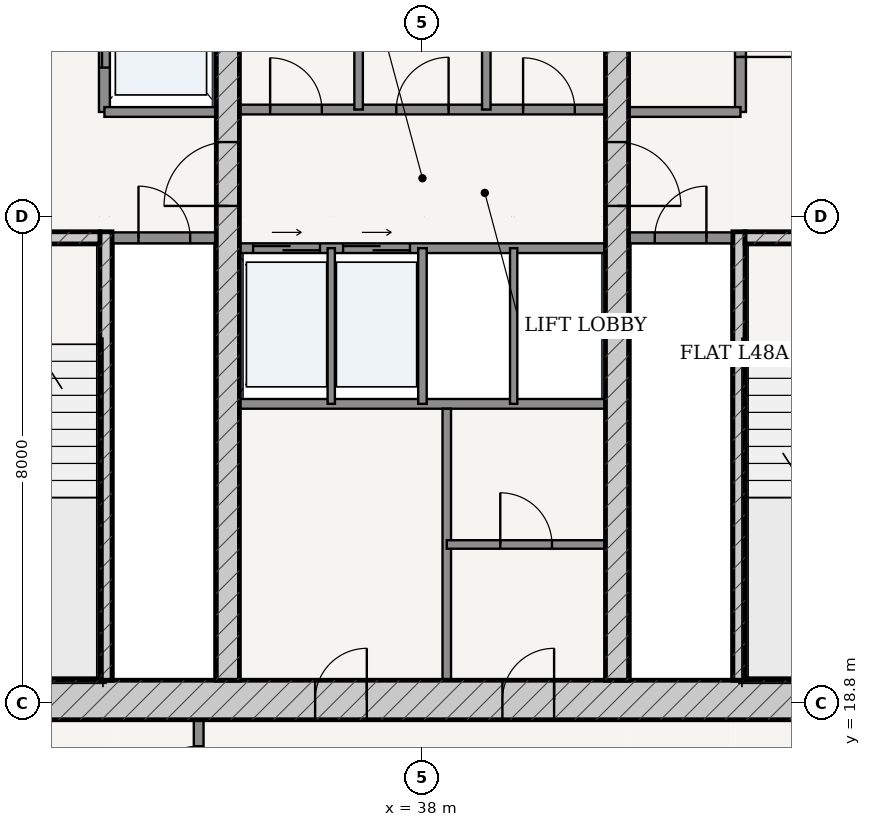
"""IFC4 building model, lengths in metres.
Left out: names, types, materials, properties, quantities, classifications, styles, units other than length and angle.
Written with IfcOpenShell. Run it as: python <this file> out.ifc"""

import sys

from ifc_helpers import new_model, si_unit, direction, frame, frame_2d, origin, place, context, subcontext, project, spatial, rectangle, extrude, source, transform, mapped, element, fill, save


model = new_model("IFC4")
c1 = context("Model", 3, precision=1e-05, world=origin(), true_north=direction((-0.2419218956, 0.970295726276)))
c2 = subcontext(c1, "Body", "Model", "MODEL_VIEW")
j1 = project(units=[si_unit("LENGTHUNIT", "METRE"), si_unit("PLANEANGLEUNIT", "RADIAN")], contexts=[c1])
p1 = place(None, origin())
s1 = spatial("IfcSite", under=j1, at=p1, CompositionType="ELEMENT")
p2 = place(p1, origin())
s2 = spatial("IfcBuilding", under=s1, at=p2, CompositionType="ELEMENT")
p3 = place(p2, frame((0.0, 0.0, 182.2)))
s3 = spatial("IfcBuildingStorey", under=s2, at=p3, CompositionType="ELEMENT", Elevation=182.2)
p4 = place(p3, frame((28.725, 18.85, 0.0), z_axis=(0.0, 0.0, 1.0), x_axis=(1.0, 0.0, 0.0)))
e1 = element("IfcWall", 1, at=p4, inside=s3, PredefinedType="SHEAR", context=c2, shape_type="SweptSolid", body=[
    extrude(rectangle(XDim=18.55, YDim=0.65, at=frame_2d((9.275, 0.0))), origin(), (0.0, 0.0, 1.0), 3.15),
])
p5 = place(p4, frame((7.51, 0.0, 0.0)))
e2 = element("IfcOpeningElement", 2, at=p5, cuts=e1, PredefinedType="OPENING", context=c2, shape_type="SweptSolid", body=[
    extrude(rectangle(XDim=0.85, YDim=2.1, at=frame_2d((0.425, 1.05))), frame((0.0, 0.335, 0.0), z_axis=(0.0, -1.0, 0.0), x_axis=(1.0, 0.0, 0.0)), (0.0, 0.0, 1.0), 0.67),
])
p6 = place(p4, frame((10.59, 0.0, 0.0)))
e3 = element("IfcOpeningElement", 3, at=p6, cuts=e1, PredefinedType="OPENING", context=c2, shape_type="SweptSolid", body=[
    extrude(rectangle(XDim=0.85, YDim=2.1, at=frame_2d((0.425, 1.05))), frame((0.0, 0.335, 0.0), z_axis=(0.0, -1.0, 0.0), x_axis=(1.0, 0.0, 0.0)), (0.0, 0.0, 1.0), 0.67),
])
p7 = place(p3, frame((32.795, 19.175, 0.0), z_axis=(0.0, 0.0, 1.0), x_axis=(0.0, 1.0, 0.0)))
e4 = element("IfcWall", 4, at=p7, inside=s3, PredefinedType="SOLIDWALL", context=c2, shape_type="SweptSolid", body=[
    extrude(rectangle(XDim=7.375, YDim=0.2, at=frame_2d((3.688, 0.0))), origin(), (0.0, 0.0, 1.0), 3.15),
])
p8 = place(p3, frame((29.375, 26.45, 0.0), z_axis=(0.0, 0.0, 1.0), x_axis=(1.0, 0.0, 0.0)))
e5 = element("IfcWall", 5, at=p8, inside=s3, PredefinedType="SOLIDWALL", context=c2, shape_type="SweptSolid", body=[
    extrude(rectangle(XDim=3.32, YDim=0.2, at=frame_2d((1.66, 0.0))), origin(), (0.0, 0.0, 1.0), 3.15),
])
p9 = place(p8, frame((1.185, 0.0, 0.0)))
e6 = element("IfcOpeningElement", 6, at=p9, cuts=e5, PredefinedType="OPENING", context=c2, shape_type="SweptSolid", body=[
    extrude(rectangle(XDim=0.95, YDim=2.15, at=frame_2d((0.475, 1.075))), frame((0.0, 0.11, 0.0), z_axis=(0.0, -1.0, 0.0), x_axis=(1.0, 0.0, 0.0)), (0.0, 0.0, 1.0), 0.22),
])
p10 = place(p3, frame((43.205, 19.175, 0.0), z_axis=(0.0, 0.0, 1.0), x_axis=(0.0, 1.0, 0.0)))
e7 = element("IfcWall", 7, at=p10, inside=s3, PredefinedType="SOLIDWALL", context=c2, shape_type="SweptSolid", body=[
    extrude(rectangle(XDim=7.375, YDim=0.2, at=frame_2d((3.688, 0.0))), origin(), (0.0, 0.0, 1.0), 3.15),
])
p11 = place(p3, frame((43.305, 26.45, 0.0), z_axis=(0.0, 0.0, 1.0), x_axis=(1.0, 0.0, 0.0)))
e8 = element("IfcWall", 8, at=p11, inside=s3, PredefinedType="SOLIDWALL", context=c2, shape_type="SweptSolid", body=[
    extrude(rectangle(XDim=3.32, YDim=0.2, at=frame_2d((1.66, 0.0))), origin(), (0.0, 0.0, 1.0), 3.15),
])
p12 = place(p11, frame((1.185, 0.0, 0.0)))
e9 = element("IfcOpeningElement", 9, at=p12, cuts=e8, PredefinedType="OPENING", context=c2, shape_type="SweptSolid", body=[
    extrude(rectangle(XDim=0.95, YDim=2.15, at=frame_2d((0.475, 1.075))), frame((0.0, 0.11, 0.0), z_axis=(0.0, -1.0, 0.0), x_axis=(1.0, 0.0, 0.0)), (0.0, 0.0, 1.0), 0.22),
])
p13 = place(p3, frame((34.8, 19.175, 0.0), z_axis=(0.0, 0.0, 1.0), x_axis=(0.0, 1.0, 0.0)))
e10 = element("IfcWall", 10, at=p13, inside=s3, PredefinedType="SHEAR", context=c2, shape_type="SweptSolid", body=[
    extrude(rectangle(XDim=15.25, YDim=0.38, at=frame_2d((7.625, 0.0))), origin(), (0.0, 0.0, 1.0), 3.15),
])
p14 = place(p13, frame((7.8, 0.0, 0.0)))
e11 = element("IfcOpeningElement", 11, at=p14, cuts=e10, PredefinedType="OPENING", context=c2, shape_type="SweptSolid", body=[
    extrude(rectangle(XDim=1.05, YDim=2.15, at=frame_2d((0.525, 1.075))), frame((0.0, 0.2, 0.0), z_axis=(0.0, -1.0, 0.0), x_axis=(1.0, 0.0, 0.0)), (0.0, 0.0, 1.0), 0.4),
])
p15 = place(p3, frame((41.2, 19.175, 0.0), z_axis=(0.0, 0.0, 1.0), x_axis=(0.0, 1.0, 0.0)))
e12 = element("IfcWall", 12, at=p15, inside=s3, PredefinedType="SHEAR", context=c2, shape_type="SweptSolid", body=[
    extrude(rectangle(XDim=15.25, YDim=0.38, at=frame_2d((7.625, 0.0))), origin(), (0.0, 0.0, 1.0), 3.15),
])
p16 = place(p15, frame((7.8, 0.0, 0.0)))
e13 = element("IfcOpeningElement", 13, at=p16, cuts=e12, PredefinedType="OPENING", context=c2, shape_type="SweptSolid", body=[
    extrude(rectangle(XDim=1.05, YDim=2.15, at=frame_2d((0.525, 1.075))), frame((0.0, 0.2, 0.0), z_axis=(0.0, -1.0, 0.0), x_axis=(1.0, 0.0, 0.0)), (0.0, 0.0, 1.0), 0.4),
])
p17 = place(p3, frame((32.9, 26.45, 0.0), z_axis=(0.0, 0.0, 1.0), x_axis=(1.0, 0.0, 0.0)))
e14 = element("IfcWall", 14, at=p17, inside=s3, PredefinedType="PARTITIONING", context=c2, shape_type="SweptSolid", body=[
    extrude(rectangle(XDim=1.71, YDim=0.18, at=frame_2d((0.855, 0.0))), origin(), (0.0, 0.0, 1.0), 3.15),
])
p18 = place(p17, frame((0.43, 0.0, 0.0)))
e15 = element("IfcOpeningElement", 15, at=p18, cuts=e14, PredefinedType="OPENING", context=c2, shape_type="SweptSolid", body=[
    extrude(rectangle(XDim=0.85, YDim=2.1, at=frame_2d((0.425, 1.05))), frame((0.0, 0.1, 0.0), z_axis=(0.0, -1.0, 0.0), x_axis=(1.0, 0.0, 0.0)), (0.0, 0.0, 1.0), 0.2),
])
p19 = place(p3, frame((41.39, 26.45, 0.0), z_axis=(0.0, 0.0, 1.0), x_axis=(1.0, 0.0, 0.0)))
e16 = element("IfcWall", 16, at=p19, inside=s3, PredefinedType="PARTITIONING", context=c2, shape_type="SweptSolid", body=[
    extrude(rectangle(XDim=1.71, YDim=0.18, at=frame_2d((0.855, 0.0))), origin(), (0.0, 0.0, 1.0), 3.15),
])
p20 = place(p19, frame((0.43, 0.0, 0.0)))
e17 = element("IfcOpeningElement", 17, at=p20, cuts=e16, PredefinedType="OPENING", context=c2, shape_type="SweptSolid", body=[
    extrude(rectangle(XDim=0.85, YDim=2.1, at=frame_2d((0.425, 1.05))), frame((0.0, 0.1, 0.0), z_axis=(0.0, -1.0, 0.0), x_axis=(1.0, 0.0, 0.0)), (0.0, 0.0, 1.0), 0.2),
])
p21 = place(p3, frame((32.77, 28.52, 0.0), z_axis=(0.0, 0.0, 1.0), x_axis=(0.0, 1.0, 0.0)))
e18 = element("IfcWall", 18, at=p21, inside=s3, PredefinedType="PARTITIONING", context=c2, shape_type="SweptSolid", body=[
    extrude(rectangle(XDim=5.905, YDim=0.18, at=frame_2d((2.953, 0.0))), origin(), (0.0, 0.0, 1.0), 3.15),
])
p22 = place(p21, frame((3.655, 0.0, 0.0)))
e19 = element("IfcOpeningElement", 19, at=p22, cuts=e18, PredefinedType="OPENING", context=c2, shape_type="SweptSolid", body=[
    extrude(rectangle(XDim=1.15, YDim=2.2, at=frame_2d((0.575, 1.1))), frame((0.0, 0.1, 0.0), z_axis=(0.0, -1.0, 0.0), x_axis=(1.0, 0.0, 0.0)), (0.0, 0.0, 1.0), 0.2),
])
p23 = place(p21, frame((0.73, 0.0, 0.0)))
e20 = element("IfcOpeningElement", 20, at=p23, cuts=e18, PredefinedType="OPENING", context=c2, shape_type="SweptSolid", body=[
    extrude(rectangle(XDim=1.2, YDim=2.25, at=frame_2d((0.6, 1.125))), frame((0.0, 0.1, 0.0), z_axis=(0.0, -1.0, 0.0), x_axis=(1.0, 0.0, 0.0)), (0.0, 0.0, 1.0), 0.2),
])
p24 = place(p3, frame((32.77, 28.52, 0.0), z_axis=(0.0, 0.0, 1.0), x_axis=(1.0, 0.0, 0.0)))
e21 = element("IfcWall", 21, at=p24, inside=s3, PredefinedType="PARTITIONING", context=c2, shape_type="SweptSolid", body=[
    extrude(rectangle(XDim=1.84, YDim=0.16, at=frame_2d((0.92, 0.0))), origin(), (0.0, 0.0, 1.0), 3.15),
])
p25 = place(p3, frame((43.23, 28.52, 0.0), z_axis=(0.0, 0.0, 1.0), x_axis=(0.0, 1.0, 0.0)))
e22 = element("IfcWall", 22, at=p25, inside=s3, PredefinedType="PARTITIONING", context=c2, shape_type="SweptSolid", body=[
    extrude(rectangle(XDim=5.905, YDim=0.18, at=frame_2d((2.953, 0.0))), origin(), (0.0, 0.0, 1.0), 3.15),
])
p26 = place(p25, frame((0.905, 0.0, 0.0)))
e23 = element("IfcOpeningElement", 23, at=p26, cuts=e22, PredefinedType="OPENING", context=c2, shape_type="SweptSolid", body=[
    extrude(rectangle(XDim=0.85, YDim=2.1, at=frame_2d((0.425, 1.05))), frame((0.0, 0.1, 0.0), z_axis=(0.0, -1.0, 0.0), x_axis=(1.0, 0.0, 0.0)), (0.0, 0.0, 1.0), 0.2),
])
p27 = place(p25, frame((3.655, 0.0, 0.0)))
e24 = element("IfcOpeningElement", 24, at=p27, cuts=e22, PredefinedType="OPENING", context=c2, shape_type="SweptSolid", body=[
    extrude(rectangle(XDim=1.15, YDim=2.2, at=frame_2d((0.575, 1.1))), frame((0.0, 0.1, 0.0), z_axis=(0.0, -1.0, 0.0), x_axis=(1.0, 0.0, 0.0)), (0.0, 0.0, 1.0), 0.2),
])
p28 = place(p3, frame((41.39, 28.52, 0.0), z_axis=(0.0, 0.0, 1.0), x_axis=(1.0, 0.0, 0.0)))
e25 = element("IfcWall", 25, at=p28, inside=s3, PredefinedType="PARTITIONING", context=c2, shape_type="SweptSolid", body=[
    extrude(rectangle(XDim=1.84, YDim=0.16, at=frame_2d((0.92, 0.0))), origin(), (0.0, 0.0, 1.0), 3.15),
])
p29 = place(p3, frame((34.99, 28.56, 0.0), z_axis=(0.0, 0.0, 1.0), x_axis=(1.0, 0.0, 0.0)))
e26 = element("IfcWall", 26, at=p29, inside=s3, PredefinedType="PARTITIONING", context=c2, shape_type="SweptSolid", body=[
    extrude(rectangle(XDim=6.02, YDim=0.16, at=frame_2d((3.01, 0.0))), origin(), (0.0, 0.0, 1.0), 3.15),
])
p30 = place(p29, frame((0.505, 0.0, 0.0)))
e27 = element("IfcOpeningElement", 27, at=p30, cuts=e26, PredefinedType="OPENING", context=c2, shape_type="SweptSolid", body=[
    extrude(rectangle(XDim=0.85, YDim=2.1, at=frame_2d((0.425, 1.05))), frame((0.0, 0.09, 0.0), z_axis=(0.0, -1.0, 0.0), x_axis=(1.0, 0.0, 0.0)), (0.0, 0.0, 1.0), 0.18),
])
p31 = place(p29, frame((2.58, 0.0, 0.0)))
e28 = element("IfcOpeningElement", 28, at=p31, cuts=e26, PredefinedType="OPENING", context=c2, shape_type="SweptSolid", body=[
    extrude(rectangle(XDim=0.86, YDim=2.1, at=frame_2d((0.43, 1.05))), frame((0.0, 0.09, 0.0), z_axis=(0.0, -1.0, 0.0), x_axis=(1.0, 0.0, 0.0)), (0.0, 0.0, 1.0), 0.18),
])
p32 = place(p29, frame((4.665, 0.0, 0.0)))
e29 = element("IfcOpeningElement", 29, at=p32, cuts=e26, PredefinedType="OPENING", context=c2, shape_type="SweptSolid", body=[
    extrude(rectangle(XDim=0.85, YDim=2.1, at=frame_2d((0.425, 1.05))), frame((0.0, 0.09, 0.0), z_axis=(0.0, -1.0, 0.0), x_axis=(1.0, 0.0, 0.0)), (0.0, 0.0, 1.0), 0.18),
])
for number, where, z_axis, x_axis in (
    (30, (36.95, 28.56, 0.0), (0.0, 0.0, 1.0), (0.0, 1.0, 0.0)),
    (31, (39.05, 28.56, 0.0), (0.0, 0.0, 1.0), (0.0, 1.0, 0.0)),
):
    element("IfcWall", number, at=place(p3, frame(where, z_axis=z_axis, x_axis=x_axis)), inside=s3, PredefinedType="PARTITIONING", context=c2, shape_type="SweptSolid", body=[
        extrude(rectangle(XDim=5.865, YDim=0.14, at=frame_2d((2.933, 0.0))), origin(), (0.0, 0.0, 1.0), 3.15),
    ])
p33 = place(p3, frame((34.99, 26.28, 0.0), z_axis=(0.0, 0.0, 1.0), x_axis=(1.0, 0.0, 0.0)))
e32 = element("IfcWall", 32, at=p33, inside=s3, PredefinedType="PARTITIONING", context=c2, shape_type="SweptSolid", body=[
    extrude(rectangle(XDim=6.02, YDim=0.16, at=frame_2d((3.01, 0.0))), origin(), (0.0, 0.0, 1.0), 3.15),
])
p34 = place(p33, frame((0.225, 0.0, 0.0)))
e33 = element("IfcOpeningElement", 33, at=p34, cuts=e32, PredefinedType="OPENING", context=c2, shape_type="SweptSolid", body=[
    extrude(rectangle(XDim=1.1, YDim=2.2, at=frame_2d((0.55, 1.1))), frame((0.0, 0.09, 0.0), z_axis=(0.0, -1.0, 0.0), x_axis=(1.0, 0.0, 0.0)), (0.0, 0.0, 1.0), 0.18),
])
p35 = place(p33, frame((1.705, 0.0, 0.0)))
e34 = element("IfcOpeningElement", 34, at=p35, cuts=e32, PredefinedType="OPENING", context=c2, shape_type="SweptSolid", body=[
    extrude(rectangle(XDim=1.1, YDim=2.2, at=frame_2d((0.55, 1.1))), frame((0.0, 0.09, 0.0), z_axis=(0.0, -1.0, 0.0), x_axis=(1.0, 0.0, 0.0)), (0.0, 0.0, 1.0), 0.18),
])
p36 = place(p3, frame((34.99, 23.72, 0.0), z_axis=(0.0, 0.0, 1.0), x_axis=(1.0, 0.0, 0.0)))
e35 = element("IfcWall", 35, at=p36, inside=s3, PredefinedType="PARTITIONING", context=c2, shape_type="SweptSolid", body=[
    extrude(rectangle(XDim=6.02, YDim=0.16, at=frame_2d((3.01, 0.0))), origin(), (0.0, 0.0, 1.0), 3.15),
])
p37 = place(p3, frame((36.5, 23.72, 0.0), z_axis=(0.0, 0.0, 1.0), x_axis=(0.0, 1.0, 0.0)))
e36 = element("IfcWall", 36, at=p37, inside=s3, PredefinedType="PARTITIONING", context=c2, shape_type="SweptSolid", body=[
    extrude(rectangle(XDim=2.56, YDim=0.12, at=frame_2d((1.28, 0.0))), origin(), (0.0, 0.0, 1.0), 3.15),
])
p38 = place(p3, frame((38.0, 23.72, 0.0), z_axis=(0.0, 0.0, 1.0), x_axis=(0.0, 1.0, 0.0)))
e37 = element("IfcWall", 37, at=p38, inside=s3, PredefinedType="PARTITIONING", context=c2, shape_type="SweptSolid", body=[
    extrude(rectangle(XDim=2.56, YDim=0.14, at=frame_2d((1.28, 0.0))), origin(), (0.0, 0.0, 1.0), 3.15),
])
p39 = place(p3, frame((39.5, 23.72, 0.0), z_axis=(0.0, 0.0, 1.0), x_axis=(0.0, 1.0, 0.0)))
e38 = element("IfcWall", 38, at=p39, inside=s3, PredefinedType="PARTITIONING", context=c2, shape_type="SweptSolid", body=[
    extrude(rectangle(XDim=2.56, YDim=0.12, at=frame_2d((1.28, 0.0))), origin(), (0.0, 0.0, 1.0), 3.15),
])
p40 = place(p3, frame((38.4, 19.175, 0.0), z_axis=(0.0, 0.0, 1.0), x_axis=(0.0, 1.0, 0.0)))
e39 = element("IfcWall", 39, at=p40, inside=s3, PredefinedType="PARTITIONING", context=c2, shape_type="SweptSolid", body=[
    extrude(rectangle(XDim=4.465, YDim=0.14, at=frame_2d((2.232, 0.0))), origin(), (0.0, 0.0, 1.0), 3.15),
])
p41 = place(p3, frame((38.4, 21.407, 0.0), z_axis=(0.0, 0.0, 1.0), x_axis=(1.0, 0.0, 0.0)))
e40 = element("IfcWall", 40, at=p41, inside=s3, PredefinedType="PARTITIONING", context=c2, shape_type="SweptSolid", body=[
    extrude(rectangle(XDim=2.61, YDim=0.14, at=frame_2d((1.305, 0.0))), origin(), (0.0, 0.0, 1.0), 3.15),
])
p42 = place(p41, frame((0.88, 0.0, 0.0)))
e41 = element("IfcOpeningElement", 41, at=p42, cuts=e40, PredefinedType="OPENING", context=c2, shape_type="SweptSolid", body=[
    extrude(rectangle(XDim=0.85, YDim=2.1, at=frame_2d((0.425, 1.05))), frame((0.0, 0.08, 0.0), z_axis=(0.0, -1.0, 0.0), x_axis=(1.0, 0.0, 0.0)), (0.0, 0.0, 1.0), 0.16),
])
p43 = place(p3, frame((34.32, 16.675, 0.0), z_axis=(0.0, 0.0, 1.0), x_axis=(0.0, 1.0, 0.0)))
e42 = element("IfcWall", 42, at=p43, inside=s3, PredefinedType="PARTITIONING", context=c2, shape_type="SweptSolid", body=[
    extrude(rectangle(XDim=1.85, YDim=0.16, at=frame_2d((0.925, 0.0))), origin(), (0.0, 0.0, 1.0), 3.15),
])
p44 = place(p43, frame((0.435, 0.0, 0.0)))
e43 = element("IfcOpeningElement", 43, at=p44, cuts=e42, PredefinedType="OPENING", context=c2, shape_type="SweptSolid", body=[
    extrude(rectangle(XDim=0.98, YDim=2.2, at=frame_2d((0.49, 1.1))), frame((0.0, 0.09, 0.0), z_axis=(0.0, -1.0, 0.0), x_axis=(1.0, 0.0, 0.0)), (0.0, 0.0, 1.0), 0.18),
])
m1 = source(origin(), c2, "Body", "SweptSolid", [
    extrude(rectangle(XDim=1.05, YDim=2.15, at=frame_2d((0.525, 1.075))), frame((0.0, 0.025, 0.0), z_axis=(0.0, -1.0, 0.0), x_axis=(1.0, 0.0, 0.0)), (0.0, 0.0, 1.0), 0.05),
])
p45 = place(p14, origin())
e44 = element("IfcDoor", 44, at=p45, inside=s3, OperationType="SINGLE_SWING_LEFT", PredefinedType="DOOR", context=c2, shape_type="MappedRepresentation", body=[
    mapped(m1, transform((0.0, 0.0, 0.0), scale=1.0)),
])
fill(e11, e44)
p46 = place(p16, frame((1.05, 0.0, 0.0), z_axis=(0.0, 0.0, 1.0), x_axis=(-1.0, 0.0, 0.0)))
e45 = element("IfcDoor", 45, at=p46, inside=s3, OperationType="SINGLE_SWING_RIGHT", PredefinedType="DOOR", context=c2, shape_type="MappedRepresentation", body=[
    mapped(m1, transform((0.0, 0.0, 0.0), scale=1.0)),
])
fill(e13, e45)
m2 = source(origin(), c2, "Body", "SweptSolid", [
    extrude(rectangle(XDim=0.85, YDim=2.1, at=frame_2d((0.425, 1.05))), frame((0.0, 0.025, 0.0), z_axis=(0.0, -1.0, 0.0), x_axis=(1.0, 0.0, 0.0)), (0.0, 0.0, 1.0), 0.05),
])
p47 = place(p18, origin())
e46 = element("IfcDoor", 46, at=p47, inside=s3, OperationType="SINGLE_SWING_LEFT", PredefinedType="DOOR", context=c2, shape_type="MappedRepresentation", body=[
    mapped(m2, transform((0.0, 0.0, 0.0), scale=1.0)),
])
fill(e15, e46)
p48 = place(p20, origin())
e47 = element("IfcDoor", 47, at=p48, inside=s3, OperationType="SINGLE_SWING_RIGHT", PredefinedType="DOOR", context=c2, shape_type="MappedRepresentation", body=[
    mapped(m2, transform((0.0, 0.0, 0.0), scale=1.0)),
])
fill(e17, e47)
p49 = place(p26, frame((0.85, 0.0, 0.0), z_axis=(0.0, 0.0, 1.0), x_axis=(-1.0, 0.0, 0.0)))
e48 = element("IfcDoor", 48, at=p49, inside=s3, OperationType="SINGLE_SWING_RIGHT", PredefinedType="DOOR", context=c2, shape_type="MappedRepresentation", body=[
    mapped(m2, transform((0.0, 0.0, 0.0), scale=1.0)),
])
fill(e23, e48)
p50 = place(p30, origin())
e49 = element("IfcDoor", 49, at=p50, inside=s3, OperationType="SINGLE_SWING_LEFT", PredefinedType="DOOR", context=c2, shape_type="MappedRepresentation", body=[
    mapped(m2, transform((0.0, 0.0, 0.0), scale=1.0)),
])
fill(e27, e49)
m3 = source(origin(), c2, "Body", "SweptSolid", [
    extrude(rectangle(XDim=0.86, YDim=2.1, at=frame_2d((0.43, 1.05))), frame((0.0, 0.025, 0.0), z_axis=(0.0, -1.0, 0.0), x_axis=(1.0, 0.0, 0.0)), (0.0, 0.0, 1.0), 0.05),
])
p51 = place(p31, origin())
e50 = element("IfcDoor", 50, at=p51, inside=s3, OperationType="SINGLE_SWING_RIGHT", PredefinedType="DOOR", context=c2, shape_type="MappedRepresentation", body=[
    mapped(m3, transform((0.0, 0.0, 0.0), scale=1.0)),
])
fill(e28, e50)
p52 = place(p32, origin())
e51 = element("IfcDoor", 51, at=p52, inside=s3, OperationType="SINGLE_SWING_LEFT", PredefinedType="DOOR", context=c2, shape_type="MappedRepresentation", body=[
    mapped(m2, transform((0.0, 0.0, 0.0), scale=1.0)),
])
fill(e29, e51)
p53 = place(p5, origin())
e52 = element("IfcDoor", 52, at=p53, inside=s3, OperationType="SINGLE_SWING_RIGHT", PredefinedType="DOOR", context=c2, shape_type="MappedRepresentation", body=[
    mapped(m2, transform((0.0, 0.0, 0.0), scale=1.0)),
])
fill(e2, e52)
p54 = place(p6, origin())
e53 = element("IfcDoor", 53, at=p54, inside=s3, OperationType="SINGLE_SWING_RIGHT", PredefinedType="DOOR", context=c2, shape_type="MappedRepresentation", body=[
    mapped(m2, transform((0.0, 0.0, 0.0), scale=1.0)),
])
fill(e3, e53)
p55 = place(p42, origin())
e54 = element("IfcDoor", 54, at=p55, inside=s3, OperationType="SINGLE_SWING_LEFT", PredefinedType="DOOR", context=c2, shape_type="MappedRepresentation", body=[
    mapped(m2, transform((0.0, 0.0, 0.0), scale=1.0)),
])
fill(e41, e54)
m4 = source(origin(), c2, "Body", "SweptSolid", [
    extrude(rectangle(XDim=1.2, YDim=2.25, at=frame_2d((0.6, 1.125))), frame((0.0, 0.025, 0.0), z_axis=(0.0, -1.0, 0.0), x_axis=(1.0, 0.0, 0.0)), (0.0, 0.0, 1.0), 0.05),
])
p56 = place(p23, origin())
e55 = element("IfcDoor", 55, at=p56, inside=s3, OperationType="DOUBLE_DOOR_SLIDING", PredefinedType="DOOR", context=c2, shape_type="MappedRepresentation", body=[
    mapped(m4, transform((0.0, 0.0, 0.0), scale=1.0)),
])
fill(e20, e55)
m5 = source(origin(), c2, "Body", "SweptSolid", [
    extrude(rectangle(XDim=1.1, YDim=2.2, at=frame_2d((0.55, 1.1))), frame((0.0, 0.025, 0.0), z_axis=(0.0, -1.0, 0.0), x_axis=(1.0, 0.0, 0.0)), (0.0, 0.0, 1.0), 0.05),
])
p57 = place(p34, origin())
e56 = element("IfcDoor", 56, at=p57, inside=s3, OperationType="DOUBLE_DOOR_SLIDING", PredefinedType="DOOR", context=c2, shape_type="MappedRepresentation", body=[
    mapped(m5, transform((0.0, 0.0, 0.0), scale=1.0)),
])
fill(e33, e56)
p58 = place(p35, origin())
e57 = element("IfcDoor", 57, at=p58, inside=s3, OperationType="DOUBLE_DOOR_SLIDING", PredefinedType="DOOR", context=c2, shape_type="MappedRepresentation", body=[
    mapped(m5, transform((0.0, 0.0, 0.0), scale=1.0)),
])
fill(e34, e57)
m6 = source(origin(), c2, "Body", "SweptSolid", [
    extrude(rectangle(XDim=0.98, YDim=2.2, at=frame_2d((0.49, 1.1))), frame((0.0, 0.025, 0.0), z_axis=(0.0, -1.0, 0.0), x_axis=(1.0, 0.0, 0.0)), (0.0, 0.0, 1.0), 0.05),
])
p59 = place(p44, origin())
e58 = element("IfcDoor", 58, at=p59, inside=s3, OperationType="SINGLE_SWING_LEFT", PredefinedType="DOOR", context=c2, shape_type="MappedRepresentation", body=[
    mapped(m6, transform((0.0, 0.0, 0.0), scale=1.0)),
])
fill(e43, e58)
save(model, sys.argv[1])
